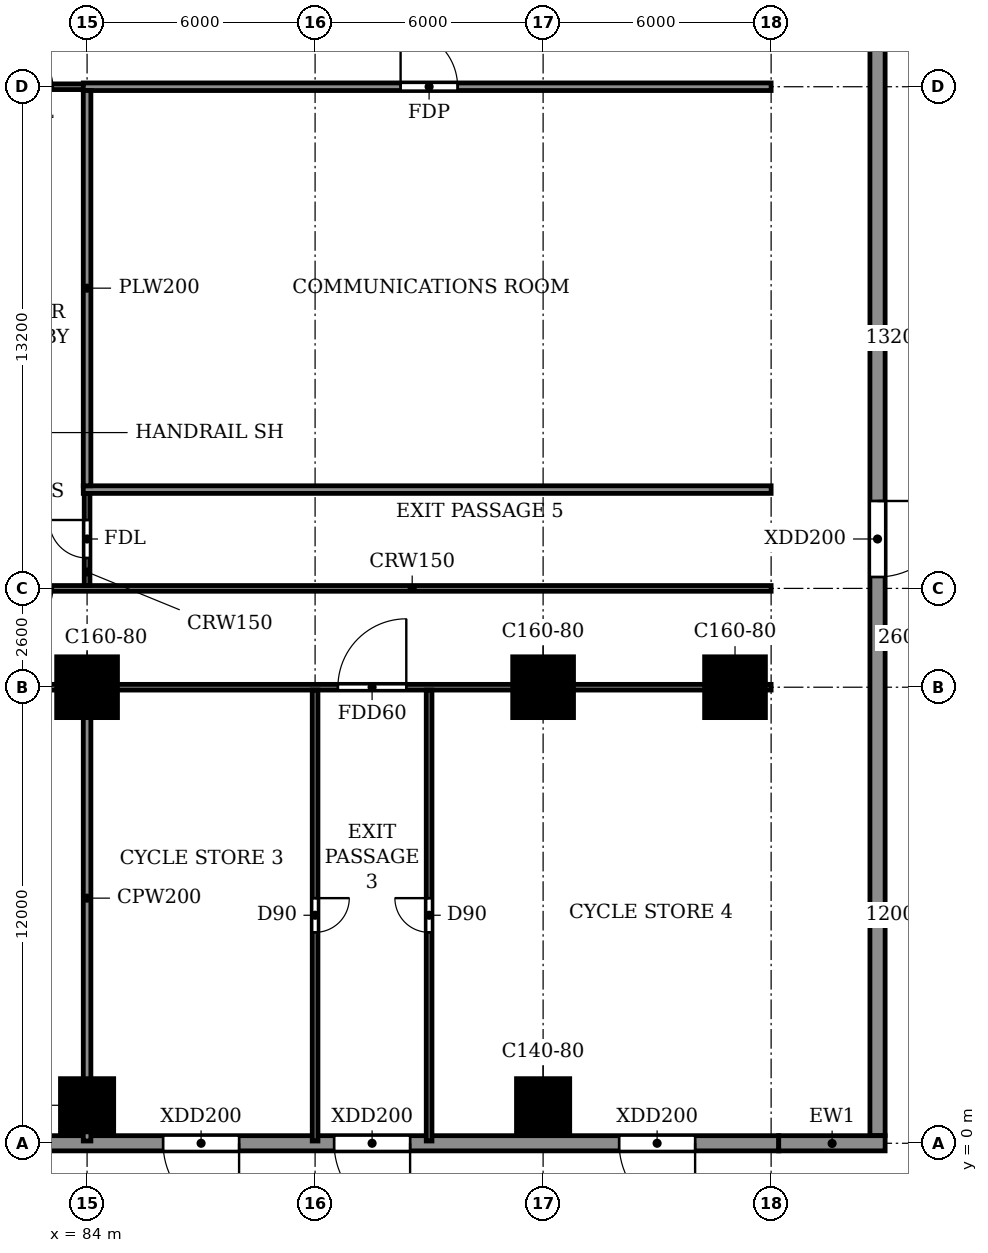
"""IFC4 building model, lengths in metres.
Left out: names, types, materials, properties, quantities, classifications, styles, units other than length and angle.
Written with IfcOpenShell. Run it as: python <this file> out.ifc"""

import sys

from ifc_helpers import new_model, si_unit, direction, frame, frame_2d, origin, origin_2d, place, context, subcontext, project, spatial, rectangle, extrude, source, transform, mapped, element, fill, save


model = new_model("IFC4")
c1 = context("Model", 3, precision=1e-05, world=origin(), true_north=direction((0.0, 1.0)))
c2 = subcontext(c1, "Body", "Model", "MODEL_VIEW")
j1 = project(units=[si_unit("LENGTHUNIT", "METRE"), si_unit("PLANEANGLEUNIT", "RADIAN")], contexts=[c1])
p1 = place(None, origin())
s1 = spatial("IfcSite", under=j1, at=p1, CompositionType="ELEMENT")
p2 = place(p1, origin())
s2 = spatial("IfcBuilding", under=s1, at=p2, CompositionType="ELEMENT")
p3 = place(p2, origin())
s3 = spatial("IfcBuildingStorey", under=s2, at=p3, CompositionType="ELEMENT", Elevation=0.0)
m1 = source(origin(), c2, "Body", "SweptSolid", [
    extrude(rectangle(XDim=1.4, YDim=1.4, at=origin_2d()), origin(), (0.0, 0.0, 1.0), 4.5),
])
p4 = place(p3, frame((84.0, 1.0, -0.3), z_axis=(0.0, 0.0, 1.0), x_axis=(1.0, 0.0, 0.0)))
e1 = element("IfcColumn", 1, at=p4, inside=s3, PredefinedType="COLUMN", context=c2, shape_type="MappedRepresentation", body=[
    mapped(m1, transform((0.0, 0.0, 0.0))),
])
m2 = source(origin(), c2, "Body", "SweptSolid", [
    extrude(rectangle(XDim=1.6, YDim=1.6, at=origin_2d()), origin(), (0.0, 0.0, 1.0), 4.5),
])
p5 = place(p3, frame((84.0, 12.0, -0.3), z_axis=(0.0, 0.0, 1.0), x_axis=(1.0, 0.0, 0.0)))
e2 = element("IfcColumn", 2, at=p5, inside=s3, PredefinedType="COLUMN", context=c2, shape_type="MappedRepresentation", body=[
    mapped(m2, transform((0.0, 0.0, 0.0))),
])
p6 = place(p3, frame((96.0, 1.0, -0.3), z_axis=(0.0, 0.0, 1.0), x_axis=(1.0, 0.0, 0.0)))
e3 = element("IfcColumn", 3, at=p6, inside=s3, PredefinedType="COLUMN", context=c2, shape_type="MappedRepresentation", body=[
    mapped(m1, transform((0.0, 0.0, 0.0))),
])
for number, where, z_axis, x_axis in (
    (4, (96.0, 12.0, -0.3), (0.0, 0.0, 1.0), (1.0, 0.0, 0.0)),
    (5, (101.05, 12.0, -0.3), (0.0, 0.0, 1.0), (1.0, 0.0, 0.0)),
):
    element("IfcColumn", number, at=place(p3, frame(where, z_axis=z_axis, x_axis=x_axis)), inside=s3, PredefinedType="COLUMN", context=c2, shape_type="MappedRepresentation", body=[
        mapped(m2, transform((0.0, 0.0, 0.0))),
    ])
p7 = place(p3, frame((104.8, 0.2, 0.0), z_axis=(0.0, 0.0, 1.0), x_axis=(0.0, 1.0, 0.0)))
e6 = element("IfcWall", 6, at=p7, inside=s3, PredefinedType="STANDARD", context=c2, shape_type="SweptSolid", body=[
    extrude(rectangle(XDim=74.4, YDim=0.4, at=frame_2d((37.2, 0.0))), origin(), (0.0, 0.0, 1.0), 5.68),
])
p8 = place(p7, frame((67.1, 0.0, 0.9)))
e7 = element("IfcOpeningElement", 7, at=p8, cuts=e6, PredefinedType="OPENING", context=c2, shape_type="SweptSolid", body=[
    extrude(rectangle(XDim=2.2, YDim=2.7, at=frame_2d((1.1, 1.35))), frame((0.0, 0.21, 0.0), z_axis=(0.0, -1.0, 0.0), x_axis=(1.0, 0.0, 0.0)), (0.0, 0.0, 1.0), 0.42),
])
p9 = place(p7, frame((56.3, 0.0, 0.0)))
e8 = element("IfcOpeningElement", 8, at=p9, cuts=e6, PredefinedType="OPENING", context=c2, shape_type="SweptSolid", body=[
    extrude(rectangle(XDim=3.6, YDim=4.5, at=frame_2d((1.8, 2.25))), frame((0.0, 0.21, 0.0), z_axis=(0.0, -1.0, 0.0), x_axis=(1.0, 0.0, 0.0)), (0.0, 0.0, 1.0), 0.42),
])
p10 = place(p7, frame((60.3, 0.0, 0.0)))
e9 = element("IfcOpeningElement", 9, at=p10, cuts=e6, PredefinedType="OPENING", context=c2, shape_type="SweptSolid", body=[
    extrude(rectangle(XDim=1.0, YDim=2.1, at=frame_2d((0.5, 1.05))), frame((0.0, 0.21, 0.0), z_axis=(0.0, -1.0, 0.0), x_axis=(1.0, 0.0, 0.0)), (0.0, 0.0, 1.0), 0.42),
])
p11 = place(p7, frame((14.7, 0.0, 0.0)))
e10 = element("IfcOpeningElement", 10, at=p11, cuts=e6, PredefinedType="OPENING", context=c2, shape_type="SweptSolid", body=[
    extrude(rectangle(XDim=2.0, YDim=2.4, at=frame_2d((1.0, 1.2))), frame((0.0, 0.21, 0.0), z_axis=(0.0, -1.0, 0.0), x_axis=(1.0, 0.0, 0.0)), (0.0, 0.0, 1.0), 0.42),
])
p12 = place(p7, frame((30.4, 0.0, 0.0)))
e11 = element("IfcOpeningElement", 11, at=p12, cuts=e6, PredefinedType="OPENING", context=c2, shape_type="SweptSolid", body=[
    extrude(rectangle(XDim=2.0, YDim=2.4, at=frame_2d((1.0, 1.2))), frame((0.0, 0.21, 0.0), z_axis=(0.0, -1.0, 0.0), x_axis=(1.0, 0.0, 0.0)), (0.0, 0.0, 1.0), 0.42),
])
p13 = place(p3, frame((-0.2, 0.0, 0.0), z_axis=(0.0, 0.0, 1.0), x_axis=(1.0, 0.0, 0.0)))
e12 = element("IfcWall", 12, at=p13, inside=s3, PredefinedType="STANDARD", context=c2, shape_type="SweptSolid", body=[
    extrude(rectangle(XDim=102.4, YDim=0.4, at=frame_2d((51.2, 0.0))), origin(), (0.0, 0.0, 1.0), 4.2),
])
p14 = place(p13, frame((13.6, 0.0, 0.0)))
e13 = element("IfcOpeningElement", 13, at=p14, cuts=e12, PredefinedType="OPENING", context=c2, shape_type="SweptSolid", body=[
    extrude(rectangle(XDim=2.0, YDim=2.4, at=frame_2d((1.0, 1.2))), frame((0.0, 0.21, 0.0), z_axis=(0.0, -1.0, 0.0), x_axis=(1.0, 0.0, 0.0)), (0.0, 0.0, 1.0), 0.42),
])
p15 = place(p13, frame((43.2, 0.0, 0.0)))
e14 = element("IfcOpeningElement", 14, at=p15, cuts=e12, PredefinedType="OPENING", context=c2, shape_type="SweptSolid", body=[
    extrude(rectangle(XDim=1.0, YDim=2.1, at=frame_2d((0.5, 1.05))), frame((0.0, 0.21, 0.0), z_axis=(0.0, -1.0, 0.0), x_axis=(1.0, 0.0, 0.0)), (0.0, 0.0, 1.0), 0.42),
])
p16 = place(p13, frame((49.6, 0.0, 0.0)))
e15 = element("IfcOpeningElement", 15, at=p16, cuts=e12, PredefinedType="OPENING", context=c2, shape_type="SweptSolid", body=[
    extrude(rectangle(XDim=2.0, YDim=2.4, at=frame_2d((1.0, 1.2))), frame((0.0, 0.21, 0.0), z_axis=(0.0, -1.0, 0.0), x_axis=(1.0, 0.0, 0.0)), (0.0, 0.0, 1.0), 0.42),
])
p17 = place(p13, frame((55.2, 0.0, 0.0)))
e16 = element("IfcOpeningElement", 16, at=p17, cuts=e12, PredefinedType="OPENING", context=c2, shape_type="SweptSolid", body=[
    extrude(rectangle(XDim=1.0, YDim=2.1, at=frame_2d((0.5, 1.05))), frame((0.0, 0.21, 0.0), z_axis=(0.0, -1.0, 0.0), x_axis=(1.0, 0.0, 0.0)), (0.0, 0.0, 1.0), 0.42),
])
p18 = place(p13, frame((65.2, 0.0, 0.0)))
e17 = element("IfcOpeningElement", 17, at=p18, cuts=e12, PredefinedType="OPENING", context=c2, shape_type="SweptSolid", body=[
    extrude(rectangle(XDim=2.0, YDim=2.4, at=frame_2d((1.0, 1.2))), frame((0.0, 0.21, 0.0), z_axis=(0.0, -1.0, 0.0), x_axis=(1.0, 0.0, 0.0)), (0.0, 0.0, 1.0), 0.42),
])
p19 = place(p13, frame((77.2, 0.0, 0.0)))
e18 = element("IfcOpeningElement", 18, at=p19, cuts=e12, PredefinedType="OPENING", context=c2, shape_type="SweptSolid", body=[
    extrude(rectangle(XDim=2.0, YDim=2.4, at=frame_2d((1.0, 1.2))), frame((0.0, 0.21, 0.0), z_axis=(0.0, -1.0, 0.0), x_axis=(1.0, 0.0, 0.0)), (0.0, 0.0, 1.0), 0.42),
])
p20 = place(p13, frame((86.2, 0.0, 0.0)))
e19 = element("IfcOpeningElement", 19, at=p20, cuts=e12, PredefinedType="OPENING", context=c2, shape_type="SweptSolid", body=[
    extrude(rectangle(XDim=2.0, YDim=2.4, at=frame_2d((1.0, 1.2))), frame((0.0, 0.21, 0.0), z_axis=(0.0, -1.0, 0.0), x_axis=(1.0, 0.0, 0.0)), (0.0, 0.0, 1.0), 0.42),
])
p21 = place(p13, frame((90.7, 0.0, 0.0)))
e20 = element("IfcOpeningElement", 20, at=p21, cuts=e12, PredefinedType="OPENING", context=c2, shape_type="SweptSolid", body=[
    extrude(rectangle(XDim=2.0, YDim=2.4, at=frame_2d((1.0, 1.2))), frame((0.0, 0.21, 0.0), z_axis=(0.0, -1.0, 0.0), x_axis=(1.0, 0.0, 0.0)), (0.0, 0.0, 1.0), 0.42),
])
p22 = place(p13, frame((98.2, 0.0, 0.0)))
e21 = element("IfcOpeningElement", 21, at=p22, cuts=e12, PredefinedType="OPENING", context=c2, shape_type="SweptSolid", body=[
    extrude(rectangle(XDim=2.0, YDim=2.4, at=frame_2d((1.0, 1.2))), frame((0.0, 0.21, 0.0), z_axis=(0.0, -1.0, 0.0), x_axis=(1.0, 0.0, 0.0)), (0.0, 0.0, 1.0), 0.42),
])
p23 = place(p3, frame((102.2, 0.0, 0.0), z_axis=(0.0, 0.0, 1.0), x_axis=(1.0, 0.0, 0.0)))
e22 = element("IfcWall", 22, at=p23, inside=s3, PredefinedType="STANDARD", context=c2, shape_type="SweptSolid", body=[
    extrude(rectangle(XDim=2.8, YDim=0.4, at=frame_2d((1.4, 0.0))), origin(), (0.0, 0.0, 1.0), 5.68),
])
p24 = place(p3, frame((38.9, 12.0, 0.0), z_axis=(0.0, 0.0, 1.0), x_axis=(1.0, 0.0, 0.0)))
e23 = element("IfcWall", 23, at=p24, inside=s3, PredefinedType="PARTITIONING", context=c2, shape_type="SweptSolid", body=[
    extrude(rectangle(XDim=63.1, YDim=0.15, at=frame_2d((31.55, 0.0))), origin(), (0.0, 0.0, 1.0), 4.2),
])
p25 = place(p24, frame((10.2, 0.0, 0.0)))
e24 = element("IfcOpeningElement", 24, at=p25, cuts=e23, PredefinedType="OPENING", context=c2, shape_type="SweptSolid", body=[
    extrude(rectangle(XDim=1.8, YDim=2.1, at=frame_2d((0.9, 1.05))), frame((0.0, 0.085, 0.0), z_axis=(0.0, -1.0, 0.0), x_axis=(1.0, 0.0, 0.0)), (0.0, 0.0, 1.0), 0.17),
])
p26 = place(p24, frame((23.65, 0.0, 0.0)))
e25 = element("IfcOpeningElement", 25, at=p26, cuts=e23, PredefinedType="OPENING", context=c2, shape_type="SweptSolid", body=[
    extrude(rectangle(XDim=0.9, YDim=2.1, at=frame_2d((0.45, 1.05))), frame((0.0, 0.085, 0.0), z_axis=(0.0, -1.0, 0.0), x_axis=(1.0, 0.0, 0.0)), (0.0, 0.0, 1.0), 0.17),
])
p27 = place(p24, frame((38.65, 0.0, 0.0)))
e26 = element("IfcOpeningElement", 26, at=p27, cuts=e23, PredefinedType="OPENING", context=c2, shape_type="SweptSolid", body=[
    extrude(rectangle(XDim=0.9, YDim=2.1, at=frame_2d((0.45, 1.05))), frame((0.0, 0.085, 0.0), z_axis=(0.0, -1.0, 0.0), x_axis=(1.0, 0.0, 0.0)), (0.0, 0.0, 1.0), 0.17),
])
p28 = place(p24, frame((51.7, 0.0, 0.0)))
e27 = element("IfcOpeningElement", 27, at=p28, cuts=e23, PredefinedType="OPENING", context=c2, shape_type="SweptSolid", body=[
    extrude(rectangle(XDim=1.8, YDim=2.1, at=frame_2d((0.9, 1.05))), frame((0.0, 0.085, 0.0), z_axis=(0.0, -1.0, 0.0), x_axis=(1.0, 0.0, 0.0)), (0.0, 0.0, 1.0), 0.17),
])
p29 = place(p3, frame((81.335, 14.6, 0.0), z_axis=(0.0, 0.0, 1.0), x_axis=(1.0, 0.0, 0.0)))
e28 = element("IfcWall", 28, at=p29, inside=s3, PredefinedType="PARTITIONING", context=c2, shape_type="SweptSolid", body=[
    extrude(rectangle(XDim=20.665, YDim=0.15, at=frame_2d((10.333, 0.0))), origin(), (0.0, 0.0, 1.0), 4.2),
])
p30 = place(p29, frame((0.765, 0.0, 0.0)))
e29 = element("IfcOpeningElement", 29, at=p30, cuts=e28, PredefinedType="OPENING", context=c2, shape_type="SweptSolid", body=[
    extrude(rectangle(XDim=1.0, YDim=2.1, at=frame_2d((0.5, 1.05))), frame((0.0, 0.085, 0.0), z_axis=(0.0, -1.0, 0.0), x_axis=(1.0, 0.0, 0.0)), (0.0, 0.0, 1.0), 0.17),
])
p31 = place(p3, frame((81.125, 27.8, 0.0), z_axis=(0.0, 0.0, 1.0), x_axis=(1.0, 0.0, 0.0)))
e30 = element("IfcWall", 30, at=p31, inside=s3, PredefinedType="PARTITIONING", context=c2, shape_type="SweptSolid", body=[
    extrude(rectangle(XDim=2.975, YDim=0.15, at=frame_2d((1.488, 0.0))), origin(), (0.0, 0.0, 1.0), 4.2),
])
p32 = place(p31, frame((0.975, 0.0, 0.0)))
e31 = element("IfcOpeningElement", 31, at=p32, cuts=e30, PredefinedType="OPENING", context=c2, shape_type="SweptSolid", body=[
    extrude(rectangle(XDim=1.0, YDim=2.1, at=frame_2d((0.5, 1.05))), frame((0.0, 0.085, 0.0), z_axis=(0.0, -1.0, 0.0), x_axis=(1.0, 0.0, 0.0)), (0.0, 0.0, 1.0), 0.17),
])
p33 = place(p3, frame((84.0, 14.675, 0.0), z_axis=(0.0, 0.0, 1.0), x_axis=(0.0, 1.0, 0.0)))
e32 = element("IfcWall", 32, at=p33, inside=s3, PredefinedType="PARTITIONING", context=c2, shape_type="SweptSolid", body=[
    extrude(rectangle(XDim=2.425, YDim=0.15, at=frame_2d((1.212, 0.0))), origin(), (0.0, 0.0, 1.0), 4.2),
])
p34 = place(p33, frame((0.725, 0.0, 0.0)))
e33 = element("IfcOpeningElement", 33, at=p34, cuts=e32, PredefinedType="OPENING", context=c2, shape_type="SweptSolid", body=[
    extrude(rectangle(XDim=1.0, YDim=2.1, at=frame_2d((0.5, 1.05))), frame((0.0, 0.085, 0.0), z_axis=(0.0, -1.0, 0.0), x_axis=(1.0, 0.0, 0.0)), (0.0, 0.0, 1.0), 0.17),
])
p35 = place(p3, frame((90.0, 0.06, 0.0), z_axis=(0.0, 0.0, 1.0), x_axis=(0.0, 1.0, 0.0)))
e34 = element("IfcWall", 34, at=p35, inside=s3, PredefinedType="PARTITIONING", context=c2, shape_type="SweptSolid", body=[
    extrude(rectangle(XDim=11.865, YDim=0.15, at=frame_2d((5.933, 0.0))), origin(), (0.0, 0.0, 1.0), 4.2),
])
p36 = place(p35, frame((5.49, 0.0, 0.0)))
e35 = element("IfcOpeningElement", 35, at=p36, cuts=e34, PredefinedType="OPENING", context=c2, shape_type="SweptSolid", body=[
    extrude(rectangle(XDim=0.9, YDim=2.1, at=frame_2d((0.45, 1.05))), frame((0.0, 0.085, 0.0), z_axis=(0.0, -1.0, 0.0), x_axis=(1.0, 0.0, 0.0)), (0.0, 0.0, 1.0), 0.17),
])
p37 = place(p3, frame((93.0, 0.06, 0.0), z_axis=(0.0, 0.0, 1.0), x_axis=(0.0, 1.0, 0.0)))
e36 = element("IfcWall", 36, at=p37, inside=s3, PredefinedType="PARTITIONING", context=c2, shape_type="SweptSolid", body=[
    extrude(rectangle(XDim=11.865, YDim=0.15, at=frame_2d((5.933, 0.0))), origin(), (0.0, 0.0, 1.0), 4.2),
])
p38 = place(p37, frame((5.49, 0.0, 0.0)))
e37 = element("IfcOpeningElement", 37, at=p38, cuts=e36, PredefinedType="OPENING", context=c2, shape_type="SweptSolid", body=[
    extrude(rectangle(XDim=0.9, YDim=2.1, at=frame_2d((0.45, 1.05))), frame((0.0, 0.085, 0.0), z_axis=(0.0, -1.0, 0.0), x_axis=(1.0, 0.0, 0.0)), (0.0, 0.0, 1.0), 0.17),
])
p39 = place(p3, frame((83.9, 17.2, 0.0), z_axis=(0.0, 0.0, 1.0), x_axis=(1.0, 0.0, 0.0)))
e38 = element("IfcWall", 38, at=p39, inside=s3, PredefinedType="PARTITIONING", context=c2, shape_type="SweptSolid", body=[
    extrude(rectangle(XDim=18.1, YDim=0.2, at=frame_2d((9.05, 0.0))), origin(), (0.0, 0.0, 1.0), 4.2),
])
p40 = place(p3, frame((83.9, 27.8, 0.0), z_axis=(0.0, 0.0, 1.0), x_axis=(1.0, 0.0, 0.0)))
e39 = element("IfcWall", 39, at=p40, inside=s3, PredefinedType="PARTITIONING", context=c2, shape_type="SweptSolid", body=[
    extrude(rectangle(XDim=18.1, YDim=0.2, at=frame_2d((9.05, 0.0))), origin(), (0.0, 0.0, 1.0), 4.2),
])
p41 = place(p40, frame((8.35, 0.0, 0.0)))
e40 = element("IfcOpeningElement", 40, at=p41, cuts=e39, PredefinedType="OPENING", context=c2, shape_type="SweptSolid", body=[
    extrude(rectangle(XDim=1.5, YDim=2.1, at=frame_2d((0.75, 1.05))), frame((0.0, 0.11, 0.0), z_axis=(0.0, -1.0, 0.0), x_axis=(1.0, 0.0, 0.0)), (0.0, 0.0, 1.0), 0.22),
])
p42 = place(p3, frame((84.0, 17.3, 0.0), z_axis=(0.0, 0.0, 1.0), x_axis=(0.0, 1.0, 0.0)))
e41 = element("IfcWall", 41, at=p42, inside=s3, PredefinedType="PARTITIONING", context=c2, shape_type="SweptSolid", body=[
    extrude(rectangle(XDim=10.4, YDim=0.2, at=frame_2d((5.2, 0.0))), origin(), (0.0, 0.0, 1.0), 4.2),
])
p43 = place(p3, frame((84.0, 0.06, 0.0), z_axis=(0.0, 0.0, 1.0), x_axis=(0.0, 1.0, 0.0)))
e42 = element("IfcWall", 42, at=p43, inside=s3, PredefinedType="PARTITIONING", context=c2, shape_type="SweptSolid", body=[
    extrude(rectangle(XDim=11.865, YDim=0.2, at=frame_2d((5.933, 0.0))), origin(), (0.0, 0.0, 1.0), 4.2),
])
p44 = place(p20, frame((2.0, 0.0, 0.0), z_axis=(0.0, 0.0, 1.0), x_axis=(-1.0, 0.0, 0.0)))
e43 = element("IfcDoor", 43, at=p44, inside=s3, OperationType="DOUBLE_DOOR_SINGLE_SWING", PredefinedType="DOOR", context=c2, shape_type="SweptSolid", body=[
    extrude(rectangle(XDim=2.0, YDim=2.4, at=frame_2d((1.0, 1.2))), frame((0.0, 0.025, 0.0), z_axis=(0.0, -1.0, 0.0), x_axis=(1.0, 0.0, 0.0)), (0.0, 0.0, 1.0), 0.05),
])
fill(e19, e43)
p45 = place(p36, frame((0.9, 0.0, 0.0), z_axis=(0.0, 0.0, 1.0), x_axis=(-1.0, 0.0, 0.0)))
e44 = element("IfcDoor", 44, at=p45, inside=s3, OperationType="SINGLE_SWING_LEFT", PredefinedType="DOOR", context=c2, shape_type="SweptSolid", body=[
    extrude(rectangle(XDim=0.9, YDim=2.1, at=frame_2d((0.45, 1.05))), frame((0.0, 0.025, 0.0), z_axis=(0.0, -1.0, 0.0), x_axis=(1.0, 0.0, 0.0)), (0.0, 0.0, 1.0), 0.05),
])
fill(e35, e44)
p46 = place(p21, frame((2.0, 0.0, 0.0), z_axis=(0.0, 0.0, 1.0), x_axis=(-1.0, 0.0, 0.0)))
e45 = element("IfcDoor", 45, at=p46, inside=s3, OperationType="DOUBLE_DOOR_SINGLE_SWING", PredefinedType="DOOR", context=c2, shape_type="SweptSolid", body=[
    extrude(rectangle(XDim=2.0, YDim=2.4, at=frame_2d((1.0, 1.2))), frame((0.0, 0.025, 0.0), z_axis=(0.0, -1.0, 0.0), x_axis=(1.0, 0.0, 0.0)), (0.0, 0.0, 1.0), 0.05),
])
fill(e20, e45)
p47 = place(p38, origin())
e46 = element("IfcDoor", 46, at=p47, inside=s3, OperationType="SINGLE_SWING_RIGHT", PredefinedType="DOOR", context=c2, shape_type="SweptSolid", body=[
    extrude(rectangle(XDim=0.9, YDim=2.1, at=frame_2d((0.45, 1.05))), frame((0.0, 0.025, 0.0), z_axis=(0.0, -1.0, 0.0), x_axis=(1.0, 0.0, 0.0)), (0.0, 0.0, 1.0), 0.05),
])
fill(e37, e46)
p48 = place(p22, frame((2.0, 0.0, 0.0), z_axis=(0.0, 0.0, 1.0), x_axis=(-1.0, 0.0, 0.0)))
e47 = element("IfcDoor", 47, at=p48, inside=s3, OperationType="DOUBLE_DOOR_SINGLE_SWING", PredefinedType="DOOR", context=c2, shape_type="SweptSolid", body=[
    extrude(rectangle(XDim=2.0, YDim=2.4, at=frame_2d((1.0, 1.2))), frame((0.0, 0.025, 0.0), z_axis=(0.0, -1.0, 0.0), x_axis=(1.0, 0.0, 0.0)), (0.0, 0.0, 1.0), 0.05),
])
fill(e21, e47)
p49 = place(p32, origin())
e48 = element("IfcDoor", 48, at=p49, inside=s3, OperationType="SINGLE_SWING_LEFT", PredefinedType="DOOR", context=c2, shape_type="SweptSolid", body=[
    extrude(rectangle(XDim=1.0, YDim=2.1, at=frame_2d((0.5, 1.05))), frame((0.0, 0.025, 0.0), z_axis=(0.0, -1.0, 0.0), x_axis=(1.0, 0.0, 0.0)), (0.0, 0.0, 1.0), 0.05),
])
fill(e31, e48)
p50 = place(p41, origin())
e49 = element("IfcDoor", 49, at=p50, inside=s3, OperationType="DOUBLE_DOOR_SINGLE_SWING", PredefinedType="DOOR", context=c2, shape_type="SweptSolid", body=[
    extrude(rectangle(XDim=1.5, YDim=2.1, at=frame_2d((0.75, 1.05))), frame((0.0, 0.025, 0.0), z_axis=(0.0, -1.0, 0.0), x_axis=(1.0, 0.0, 0.0)), (0.0, 0.0, 1.0), 0.05),
])
fill(e40, e49)
p51 = place(p30, frame((1.0, 0.0, 0.0), z_axis=(0.0, 0.0, 1.0), x_axis=(-1.0, 0.0, 0.0)))
e50 = element("IfcDoor", 50, at=p51, inside=s3, OperationType="SINGLE_SWING_RIGHT", PredefinedType="DOOR", context=c2, shape_type="SweptSolid", body=[
    extrude(rectangle(XDim=1.0, YDim=2.1, at=frame_2d((0.5, 1.05))), frame((0.0, 0.025, 0.0), z_axis=(0.0, -1.0, 0.0), x_axis=(1.0, 0.0, 0.0)), (0.0, 0.0, 1.0), 0.05),
])
fill(e29, e50)
p52 = place(p28, origin())
e51 = element("IfcDoor", 51, at=p52, inside=s3, OperationType="DOUBLE_DOOR_SINGLE_SWING", PredefinedType="DOOR", context=c2, shape_type="SweptSolid", body=[
    extrude(rectangle(XDim=1.8, YDim=2.1, at=frame_2d((0.9, 1.05))), frame((0.0, 0.025, 0.0), z_axis=(0.0, -1.0, 0.0), x_axis=(1.0, 0.0, 0.0)), (0.0, 0.0, 1.0), 0.05),
])
fill(e27, e51)
p53 = place(p11, frame((2.0, 0.0, 0.0), z_axis=(0.0, 0.0, 1.0), x_axis=(-1.0, 0.0, 0.0)))
e52 = element("IfcDoor", 52, at=p53, inside=s3, OperationType="DOUBLE_DOOR_SINGLE_SWING", PredefinedType="DOOR", context=c2, shape_type="SweptSolid", body=[
    extrude(rectangle(XDim=2.0, YDim=2.4, at=frame_2d((1.0, 1.2))), frame((0.0, 0.025, 0.0), z_axis=(0.0, -1.0, 0.0), x_axis=(1.0, 0.0, 0.0)), (0.0, 0.0, 1.0), 0.05),
])
fill(e10, e52)
p54 = place(p34, origin())
e53 = element("IfcDoor", 53, at=p54, inside=s3, OperationType="SINGLE_SWING_RIGHT", PredefinedType="DOOR", context=c2, shape_type="SweptSolid", body=[
    extrude(rectangle(XDim=1.0, YDim=2.1, at=frame_2d((0.5, 1.05))), frame((0.0, 0.025, 0.0), z_axis=(0.0, -1.0, 0.0), x_axis=(1.0, 0.0, 0.0)), (0.0, 0.0, 1.0), 0.05),
])
fill(e33, e53)
save(model, sys.argv[1])
